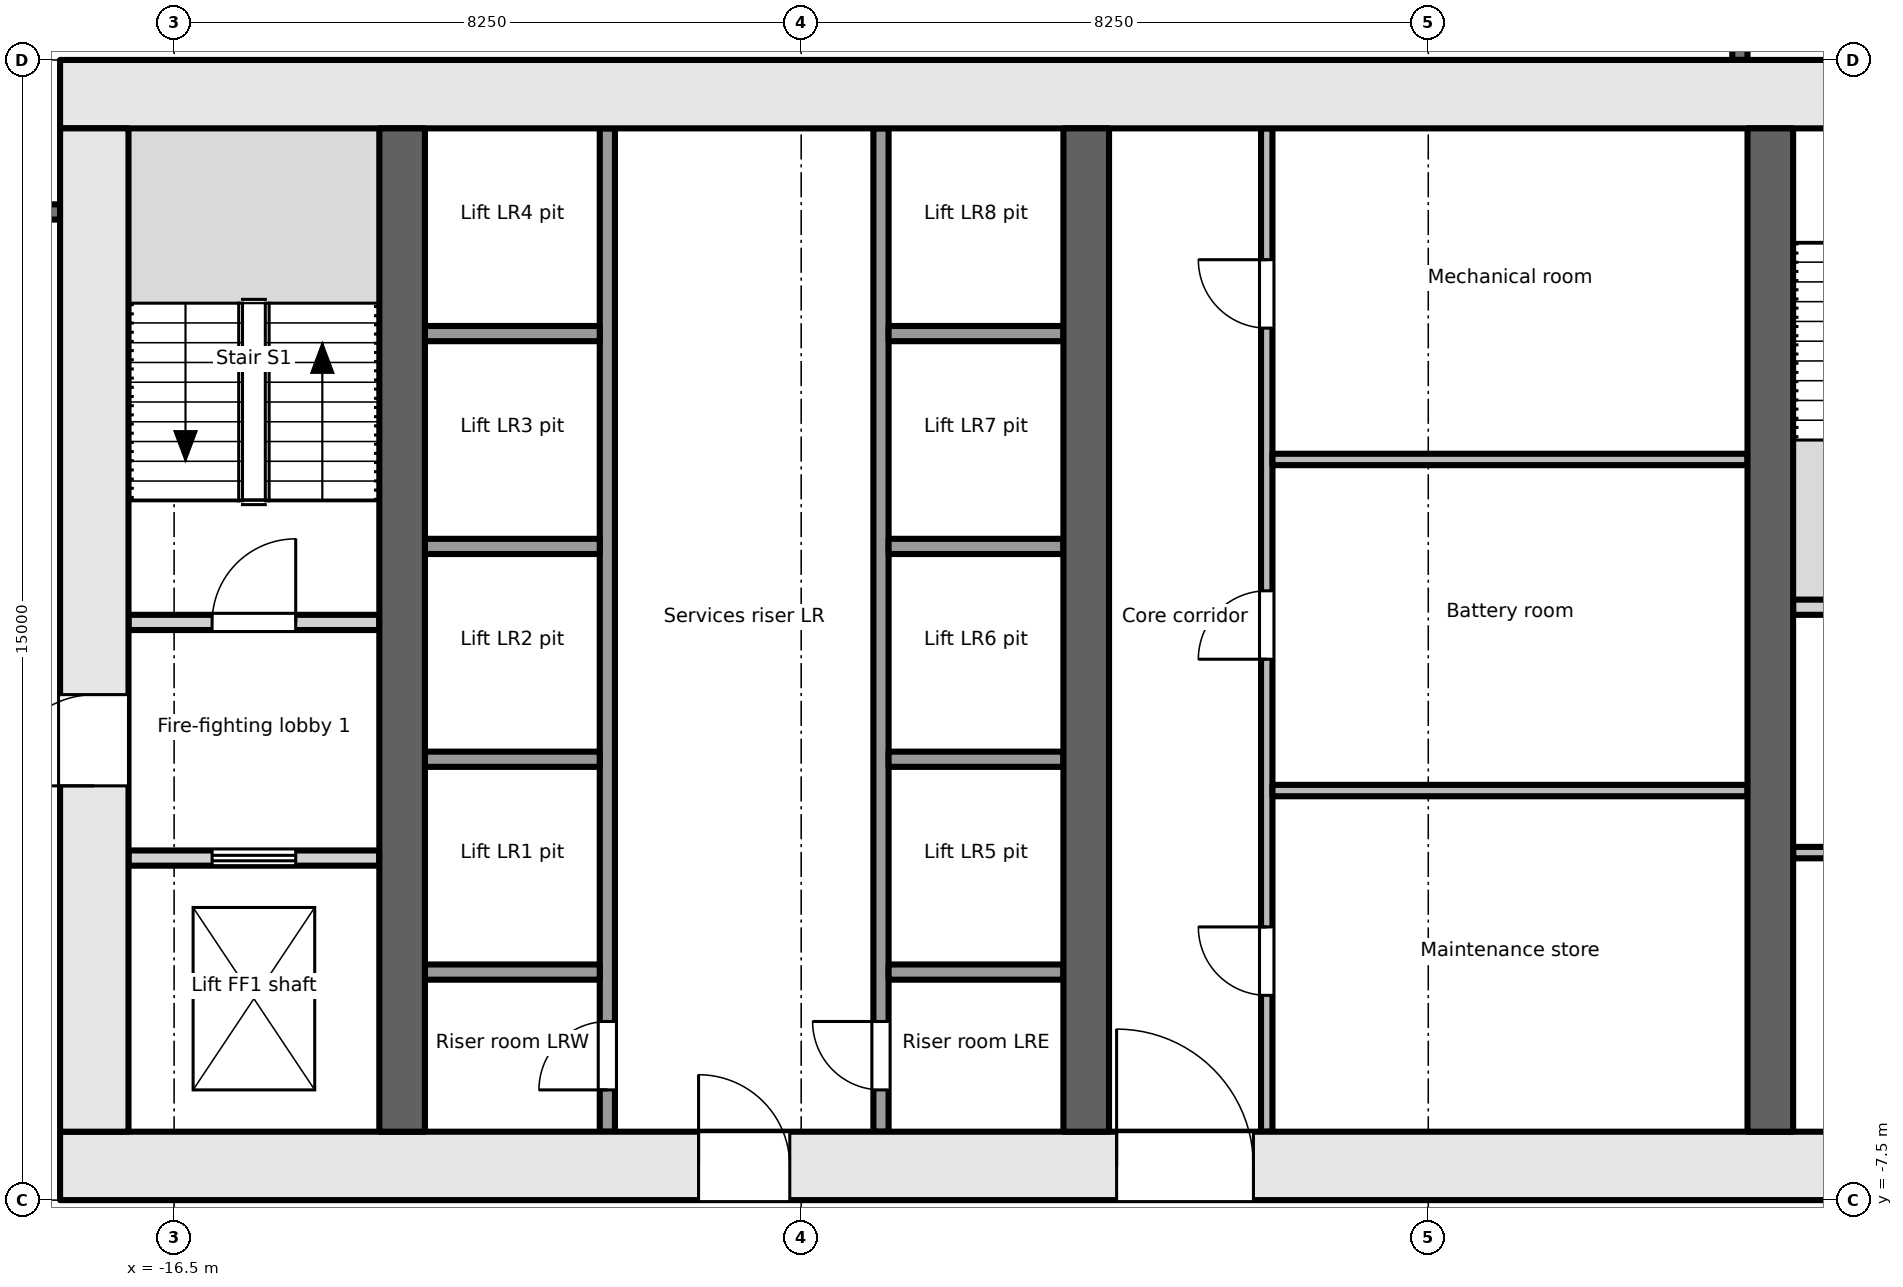
"""IFC4 building model, lengths in metres.
Left out: names, types, materials, properties, quantities, classifications, styles, units other than length and angle.
Written with IfcOpenShell. Run it as: python <this file> out.ifc"""

import sys

from ifc_helpers import new_model, si_unit, direction, frame, frame_2d, origin, place, context, subcontext, project, spatial, rectangle, extrude, element, fill, save


model = new_model("IFC4")
c1 = context("Model", 3, precision=1e-05, world=origin(), true_north=direction((0.0, 1.0)))
c2 = subcontext(c1, "Body", "Model", "MODEL_VIEW")
j1 = project(units=[si_unit("LENGTHUNIT", "METRE"), si_unit("PLANEANGLEUNIT", "RADIAN")], contexts=[c1])
p1 = place(None, origin())
s1 = spatial("IfcSite", under=j1, at=p1, CompositionType="ELEMENT")
p2 = place(p1, origin())
s2 = spatial("IfcBuilding", under=s1, at=p2, CompositionType="ELEMENT")
p3 = place(p2, frame((0.0, 0.0, -9.5)))
s3 = spatial("IfcBuildingStorey", under=s2, at=p3, CompositionType="ELEMENT", Elevation=-9.5)
p4 = place(p3, frame((-18.0, -7.05, -0.2), z_axis=(0.0, 0.0, 1.0), x_axis=(1.0, 0.0, 0.0)))
e1 = element("IfcWall", 1, at=p4, inside=s3, PredefinedType="SHEAR", context=c2, shape_type="SweptSolid", body=[
    extrude(rectangle(XDim=36.0, YDim=0.9, at=frame_2d((18.0, 0.0))), origin(), (0.0, 0.0, 1.0), 4.0),
])
p5 = place(p4, frame((8.4, 0.0, 0.2)))
e2 = element("IfcOpeningElement", 2, at=p5, cuts=e1, PredefinedType="OPENING", context=c2, shape_type="SweptSolid", body=[
    extrude(rectangle(XDim=1.2, YDim=2.1, at=frame_2d((0.6, 1.05))), frame((0.0, 0.46, 0.0), z_axis=(0.0, -1.0, 0.0), x_axis=(1.0, 0.0, 0.0)), (0.0, 0.0, 1.0), 0.921),
])
p6 = place(p4, frame((13.9, 0.0, 0.2)))
e3 = element("IfcOpeningElement", 3, at=p6, cuts=e1, PredefinedType="OPENING", context=c2, shape_type="SweptSolid", body=[
    extrude(rectangle(XDim=1.8, YDim=2.1, at=frame_2d((0.9, 1.05))), frame((0.0, 0.46, 0.0), z_axis=(0.0, -1.0, 0.0), x_axis=(1.0, 0.0, 0.0)), (0.0, 0.0, 1.0), 0.921),
])
p7 = place(p4, frame((26.1, 0.0, 0.2)))
e4 = element("IfcOpeningElement", 4, at=p7, cuts=e1, PredefinedType="OPENING", context=c2, shape_type="SweptSolid", body=[
    extrude(rectangle(XDim=2.4, YDim=2.1, at=frame_2d((1.2, 1.05))), frame((0.0, 0.46, 0.0), z_axis=(0.0, -1.0, 0.0), x_axis=(1.0, 0.0, 0.0)), (0.0, 0.0, 1.0), 0.921),
])
p8 = place(p3, frame((-18.0, 7.05, -0.2), z_axis=(0.0, 0.0, 1.0), x_axis=(1.0, 0.0, 0.0)))
e5 = element("IfcWall", 5, at=p8, inside=s3, PredefinedType="SHEAR", context=c2, shape_type="SweptSolid", body=[
    extrude(rectangle(XDim=36.0, YDim=0.9, at=frame_2d((18.0, 0.0))), origin(), (0.0, 0.0, 1.0), 4.0),
])
p9 = place(p3, frame((-17.55, -6.6, -0.2), z_axis=(0.0, 0.0, 1.0), x_axis=(0.0, 1.0, 0.0)))
e6 = element("IfcWall", 6, at=p9, inside=s3, PredefinedType="SHEAR", context=c2, shape_type="SweptSolid", body=[
    extrude(rectangle(XDim=13.2, YDim=0.9, at=frame_2d((6.6, 0.0))), origin(), (0.0, 0.0, 1.0), 4.0),
])
p10 = place(p9, frame((4.55, 0.0, 0.2)))
e7 = element("IfcOpeningElement", 7, at=p10, cuts=e6, PredefinedType="OPENING", context=c2, shape_type="SweptSolid", body=[
    extrude(rectangle(XDim=1.2, YDim=2.1, at=frame_2d((0.6, 1.05))), frame((0.0, 0.46, 0.0), z_axis=(0.0, -1.0, 0.0), x_axis=(1.0, 0.0, 0.0)), (0.0, 0.0, 1.0), 0.921),
])
for number, where, z_axis, x_axis in (
    (8, (-13.5, -6.6, -0.2), (0.0, 0.0, 1.0), (0.0, 1.0, 0.0)),
    (9, (-4.5, -6.6, -0.2), (0.0, 0.0, 1.0), (0.0, 1.0, 0.0)),
    (10, (4.5, -6.6, -0.2), (0.0, 0.0, 1.0), (0.0, 1.0, 0.0)),
):
    element("IfcWall", number, at=place(p3, frame(where, z_axis=z_axis, x_axis=x_axis)), inside=s3, PredefinedType="SHEAR", context=c2, shape_type="SweptSolid", body=[
        extrude(rectangle(XDim=13.2, YDim=0.6, at=frame_2d((6.6, 0.0))), origin(), (0.0, 0.0, 1.0), 4.0),
    ])
p11 = place(p3, frame((-17.1, -3.0, 0.0), z_axis=(0.0, 0.0, 1.0), x_axis=(1.0, 0.0, 0.0)))
e11 = element("IfcWall", 11, at=p11, inside=s3, PredefinedType="PARTITIONING", context=c2, shape_type="SweptSolid", body=[
    extrude(rectangle(XDim=3.3, YDim=0.2, at=frame_2d((1.65, 0.0))), origin(), (0.0, 0.0, 1.0), 3.8),
])
p12 = place(p11, frame((1.1, 0.0, 0.0)))
e12 = element("IfcOpeningElement", 12, at=p12, cuts=e11, PredefinedType="OPENING", context=c2, shape_type="SweptSolid", body=[
    extrude(rectangle(XDim=1.1, YDim=2.1, at=frame_2d((0.55, 1.05))), frame((0.0, 0.111, 0.0), z_axis=(0.0, -1.0, 0.0), x_axis=(1.0, 0.0, 0.0)), (0.0, 0.0, 1.0), 0.221),
])
p13 = place(p3, frame((-17.1, 0.1, 0.0), z_axis=(0.0, 0.0, 1.0), x_axis=(1.0, 0.0, 0.0)))
e13 = element("IfcWall", 13, at=p13, inside=s3, PredefinedType="PARTITIONING", context=c2, shape_type="SweptSolid", body=[
    extrude(rectangle(XDim=3.3, YDim=0.2, at=frame_2d((1.65, 0.0))), origin(), (0.0, 0.0, 1.0), 3.8),
])
p14 = place(p13, frame((1.1, 0.0, 0.0)))
e14 = element("IfcOpeningElement", 14, at=p14, cuts=e13, PredefinedType="OPENING", context=c2, shape_type="SweptSolid", body=[
    extrude(rectangle(XDim=1.1, YDim=2.1, at=frame_2d((0.55, 1.05))), frame((0.0, 0.111, 0.0), z_axis=(0.0, -1.0, 0.0), x_axis=(1.0, 0.0, 0.0)), (0.0, 0.0, 1.0), 0.221),
])
p15 = place(p3, frame((-10.8, -6.6, 0.0), z_axis=(0.0, 0.0, 1.0), x_axis=(0.0, 1.0, 0.0)))
e15 = element("IfcWall", 15, at=p15, inside=s3, PredefinedType="PARTITIONING", context=c2, shape_type="SweptSolid", body=[
    extrude(rectangle(XDim=13.2, YDim=0.2, at=frame_2d((6.6, 0.0))), origin(), (0.0, 0.0, 1.0), 3.8),
])
p16 = place(p15, frame((0.55, 0.0, 0.0)))
e16 = element("IfcOpeningElement", 16, at=p16, cuts=e15, PredefinedType="OPENING", context=c2, shape_type="SweptSolid", body=[
    extrude(rectangle(XDim=0.9, YDim=2.1, at=frame_2d((0.45, 1.05))), frame((0.0, 0.111, 0.0), z_axis=(0.0, -1.0, 0.0), x_axis=(1.0, 0.0, 0.0)), (0.0, 0.0, 1.0), 0.221),
])
p17 = place(p3, frame((-7.2, -6.6, 0.0), z_axis=(0.0, 0.0, 1.0), x_axis=(0.0, 1.0, 0.0)))
e17 = element("IfcWall", 17, at=p17, inside=s3, PredefinedType="PARTITIONING", context=c2, shape_type="SweptSolid", body=[
    extrude(rectangle(XDim=13.2, YDim=0.2, at=frame_2d((6.6, 0.0))), origin(), (0.0, 0.0, 1.0), 3.8),
])
p18 = place(p17, frame((0.55, 0.0, 0.0)))
e18 = element("IfcOpeningElement", 18, at=p18, cuts=e17, PredefinedType="OPENING", context=c2, shape_type="SweptSolid", body=[
    extrude(rectangle(XDim=0.9, YDim=2.1, at=frame_2d((0.45, 1.05))), frame((0.0, 0.111, 0.0), z_axis=(0.0, -1.0, 0.0), x_axis=(1.0, 0.0, 0.0)), (0.0, 0.0, 1.0), 0.221),
])
for number, where, z_axis, x_axis in (
    (19, (-13.2, -1.7, 0.0), (0.0, 0.0, 1.0), (1.0, 0.0, 0.0)),
    (20, (-13.2, 1.1, 0.0), (0.0, 0.0, 1.0), (1.0, 0.0, 0.0)),
    (21, (-13.2, 3.9, 0.0), (0.0, 0.0, 1.0), (1.0, 0.0, 0.0)),
    (22, (-13.2, -4.5, 0.0), (0.0, 0.0, 1.0), (1.0, 0.0, 0.0)),
    (23, (-7.1, -1.7, 0.0), (0.0, 0.0, 1.0), (1.0, 0.0, 0.0)),
    (24, (-7.1, 1.1, 0.0), (0.0, 0.0, 1.0), (1.0, 0.0, 0.0)),
    (25, (-7.1, 3.9, 0.0), (0.0, 0.0, 1.0), (1.0, 0.0, 0.0)),
    (26, (-7.1, -4.5, 0.0), (0.0, 0.0, 1.0), (1.0, 0.0, 0.0)),
):
    element("IfcWall", number, at=place(p3, frame(where, z_axis=z_axis, x_axis=x_axis)), inside=s3, PredefinedType="PARTITIONING", context=c2, shape_type="SweptSolid", body=[
        extrude(rectangle(XDim=2.3, YDim=0.2, at=frame_2d((1.15, 0.0))), origin(), (0.0, 0.0, 1.0), 3.8),
    ])
p19 = place(p3, frame((-2.125, -6.6, 0.0), z_axis=(0.0, 0.0, 1.0), x_axis=(0.0, 1.0, 0.0)))
e27 = element("IfcWall", 27, at=p19, inside=s3, PredefinedType="PARTITIONING", context=c2, shape_type="SweptSolid", body=[
    extrude(rectangle(XDim=13.2, YDim=0.15, at=frame_2d((6.6, 0.0))), origin(), (0.0, 0.0, 1.0), 3.8),
])
p20 = place(p19, frame((1.794, 0.0, 0.0)))
e28 = element("IfcOpeningElement", 28, at=p20, cuts=e27, PredefinedType="OPENING", context=c2, shape_type="SweptSolid", body=[
    extrude(rectangle(XDim=0.9, YDim=2.1, at=frame_2d((0.45, 1.05))), frame((0.0, 0.085, 0.0), z_axis=(0.0, -1.0, 0.0), x_axis=(1.0, 0.0, 0.0)), (0.0, 0.0, 1.0), 0.171),
])
p21 = place(p19, frame((6.216, 0.0, 0.0)))
e29 = element("IfcOpeningElement", 29, at=p21, cuts=e27, PredefinedType="OPENING", context=c2, shape_type="SweptSolid", body=[
    extrude(rectangle(XDim=0.9, YDim=2.1, at=frame_2d((0.45, 1.05))), frame((0.0, 0.085, 0.0), z_axis=(0.0, -1.0, 0.0), x_axis=(1.0, 0.0, 0.0)), (0.0, 0.0, 1.0), 0.171),
])
p22 = place(p19, frame((10.572, 0.0, 0.0)))
e30 = element("IfcOpeningElement", 30, at=p22, cuts=e27, PredefinedType="OPENING", context=c2, shape_type="SweptSolid", body=[
    extrude(rectangle(XDim=0.9, YDim=2.1, at=frame_2d((0.45, 1.05))), frame((0.0, 0.085, 0.0), z_axis=(0.0, -1.0, 0.0), x_axis=(1.0, 0.0, 0.0)), (0.0, 0.0, 1.0), 0.171),
])
for number, where, z_axis, x_axis in (
    (31, (-2.05, -2.112, 0.0), (0.0, 0.0, 1.0), (1.0, 0.0, 0.0)),
    (32, (-2.05, 2.244, 0.0), (0.0, 0.0, 1.0), (1.0, 0.0, 0.0)),
):
    element("IfcWall", number, at=place(p3, frame(where, z_axis=z_axis, x_axis=x_axis)), inside=s3, PredefinedType="PARTITIONING", context=c2, shape_type="SweptSolid", body=[
        extrude(rectangle(XDim=6.25, YDim=0.15, at=frame_2d((3.125, 0.0))), origin(), (0.0, 0.0, 1.0), 3.8),
    ])
p23 = place(p3, frame((4.8, 0.3, 0.0), z_axis=(0.0, 0.0, 1.0), x_axis=(1.0, 0.0, 0.0)))
e33 = element("IfcWall", 33, at=p23, inside=s3, PredefinedType="PARTITIONING", context=c2, shape_type="SweptSolid", body=[
    extrude(rectangle(XDim=3.15, YDim=0.2, at=frame_2d((1.575, 0.0))), origin(), (0.0, 0.0, 1.0), 3.8),
])
p24 = place(p3, frame((4.8, -2.928, 0.0), z_axis=(0.0, 0.0, 1.0), x_axis=(1.0, 0.0, 0.0)))
e34 = element("IfcWall", 34, at=p24, inside=s3, PredefinedType="PARTITIONING", context=c2, shape_type="SweptSolid", body=[
    extrude(rectangle(XDim=3.15, YDim=0.15, at=frame_2d((1.575, 0.0))), origin(), (0.0, 0.0, 1.0), 3.8),
])
p25 = place(p3, frame((-20.4, 5.5, 0.0), z_axis=(0.0, 0.0, 1.0), x_axis=(1.0, 0.0, 0.0)))
e35 = element("IfcWall", 35, at=p25, inside=s3, PredefinedType="PARTITIONING", context=c2, shape_type="SweptSolid", body=[
    extrude(rectangle(XDim=2.4, YDim=0.2, at=frame_2d((1.2, 0.0))), origin(), (0.0, 0.0, 1.0), 3.8),
])
p26 = place(p25, frame((0.75, 0.0, 0.0)))
e36 = element("IfcOpeningElement", 36, at=p26, cuts=e35, PredefinedType="OPENING", context=c2, shape_type="SweptSolid", body=[
    extrude(rectangle(XDim=0.9, YDim=2.1, at=frame_2d((0.45, 1.05))), frame((0.0, 0.111, 0.0), z_axis=(0.0, -1.0, 0.0), x_axis=(1.0, 0.0, 0.0)), (0.0, 0.0, 1.0), 0.221),
])
p27 = place(p3, frame((4.1, 13.74, 0.0), z_axis=(0.0, 0.0, 1.0), x_axis=(0.0, -1.0, 0.0)))
e37 = element("IfcWall", 37, at=p27, inside=s3, PredefinedType="PARTITIONING", context=c2, shape_type="SweptSolid", body=[
    extrude(rectangle(XDim=6.24, YDim=0.2, at=frame_2d((3.12, 0.0))), origin(), (0.0, 0.0, 1.0), 2.8),
])
p28 = place(p12, origin())
e38 = element("IfcDoor", 38, at=p28, inside=s3, OperationType="DOUBLE_DOOR_SLIDING", PredefinedType="DOOR", context=c2, shape_type="SweptSolid", body=[
    extrude(rectangle(XDim=1.1, YDim=2.1, at=frame_2d((0.55, 1.05))), frame((0.0, 0.025, 0.0), z_axis=(0.0, -1.0, 0.0), x_axis=(1.0, 0.0, 0.0)), (0.0, 0.0, 1.0), 0.05),
])
fill(e12, e38)
p29 = place(p10, origin())
e39 = element("IfcDoor", 39, at=p29, inside=s3, OperationType="SINGLE_SWING_LEFT", PredefinedType="DOOR", context=c2, shape_type="SweptSolid", body=[
    extrude(rectangle(XDim=1.2, YDim=2.1, at=frame_2d((0.6, 1.05))), frame((0.0, 0.025, 0.0), z_axis=(0.0, -1.0, 0.0), x_axis=(1.0, 0.0, 0.0)), (0.0, 0.0, 1.0), 0.05),
])
fill(e7, e39)
p30 = place(p14, origin())
e40 = element("IfcDoor", 40, at=p30, inside=s3, OperationType="SINGLE_SWING_RIGHT", PredefinedType="DOOR", context=c2, shape_type="SweptSolid", body=[
    extrude(rectangle(XDim=1.1, YDim=2.1, at=frame_2d((0.55, 1.05))), frame((0.0, 0.025, 0.0), z_axis=(0.0, -1.0, 0.0), x_axis=(1.0, 0.0, 0.0)), (0.0, 0.0, 1.0), 0.05),
])
fill(e14, e40)
p31 = place(p16, origin())
e41 = element("IfcDoor", 41, at=p31, inside=s3, OperationType="SINGLE_SWING_LEFT", PredefinedType="DOOR", context=c2, shape_type="SweptSolid", body=[
    extrude(rectangle(XDim=0.9, YDim=2.1, at=frame_2d((0.45, 1.05))), frame((0.0, 0.025, 0.0), z_axis=(0.0, -1.0, 0.0), x_axis=(1.0, 0.0, 0.0)), (0.0, 0.0, 1.0), 0.05),
])
fill(e16, e41)
p32 = place(p18, origin())
e42 = element("IfcDoor", 42, at=p32, inside=s3, OperationType="SINGLE_SWING_RIGHT", PredefinedType="DOOR", context=c2, shape_type="SweptSolid", body=[
    extrude(rectangle(XDim=0.9, YDim=2.1, at=frame_2d((0.45, 1.05))), frame((0.0, 0.025, 0.0), z_axis=(0.0, -1.0, 0.0), x_axis=(1.0, 0.0, 0.0)), (0.0, 0.0, 1.0), 0.05),
])
fill(e18, e42)
p33 = place(p5, origin())
e43 = element("IfcDoor", 43, at=p33, inside=s3, OperationType="SINGLE_SWING_LEFT", PredefinedType="DOOR", context=c2, shape_type="SweptSolid", body=[
    extrude(rectangle(XDim=1.2, YDim=2.1, at=frame_2d((0.6, 1.05))), frame((0.0, 0.025, 0.0), z_axis=(0.0, -1.0, 0.0), x_axis=(1.0, 0.0, 0.0)), (0.0, 0.0, 1.0), 0.05),
])
fill(e2, e43)
p34 = place(p20, origin())
e44 = element("IfcDoor", 44, at=p34, inside=s3, OperationType="SINGLE_SWING_RIGHT", PredefinedType="DOOR", context=c2, shape_type="SweptSolid", body=[
    extrude(rectangle(XDim=0.9, YDim=2.1, at=frame_2d((0.45, 1.05))), frame((0.0, 0.025, 0.0), z_axis=(0.0, -1.0, 0.0), x_axis=(1.0, 0.0, 0.0)), (0.0, 0.0, 1.0), 0.05),
])
fill(e28, e44)
p35 = place(p21, origin())
e45 = element("IfcDoor", 45, at=p35, inside=s3, OperationType="SINGLE_SWING_LEFT", PredefinedType="DOOR", context=c2, shape_type="SweptSolid", body=[
    extrude(rectangle(XDim=0.9, YDim=2.1, at=frame_2d((0.45, 1.05))), frame((0.0, 0.025, 0.0), z_axis=(0.0, -1.0, 0.0), x_axis=(1.0, 0.0, 0.0)), (0.0, 0.0, 1.0), 0.05),
])
fill(e29, e45)
p36 = place(p22, origin())
e46 = element("IfcDoor", 46, at=p36, inside=s3, OperationType="SINGLE_SWING_RIGHT", PredefinedType="DOOR", context=c2, shape_type="SweptSolid", body=[
    extrude(rectangle(XDim=0.9, YDim=2.1, at=frame_2d((0.45, 1.05))), frame((0.0, 0.025, 0.0), z_axis=(0.0, -1.0, 0.0), x_axis=(1.0, 0.0, 0.0)), (0.0, 0.0, 1.0), 0.05),
])
fill(e30, e46)
p37 = place(p6, origin())
e47 = element("IfcDoor", 47, at=p37, inside=s3, OperationType="SINGLE_SWING_LEFT", PredefinedType="DOOR", context=c2, shape_type="SweptSolid", body=[
    extrude(rectangle(XDim=1.8, YDim=2.1, at=frame_2d((0.9, 1.05))), frame((0.0, 0.025, 0.0), z_axis=(0.0, -1.0, 0.0), x_axis=(1.0, 0.0, 0.0)), (0.0, 0.0, 1.0), 0.05),
])
fill(e3, e47)
save(model, sys.argv[1])
